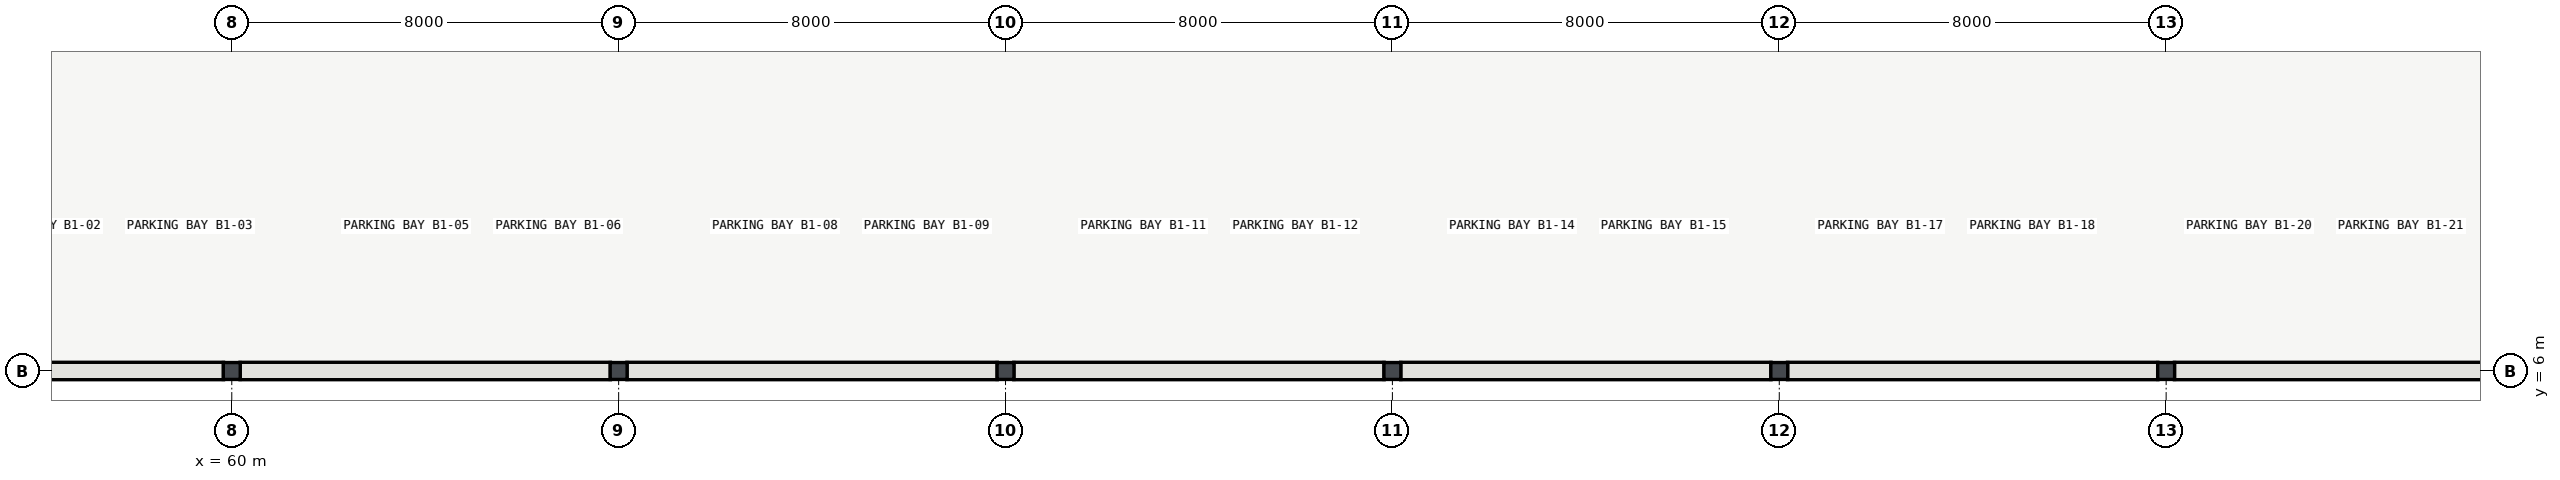
"""IFC4 building model, lengths in metres.
Left out: names, types, materials, properties, quantities, classifications, styles, units other than length and angle.
Written with IfcOpenShell. Run it as: python <this file> out.ifc"""

import sys

from ifc_helpers import new_model, si_unit, direction, frame, frame_2d, origin, origin_2d, place, context, subcontext, project, spatial, rectangle, i_section, extrude, element, save


model = new_model("IFC4")
c1 = context("Model", 3, precision=1e-05, world=origin(), true_north=direction((0.0, 1.0)))
c2 = subcontext(c1, "Body", "Model", "MODEL_VIEW")
j1 = project(units=[si_unit("LENGTHUNIT", "METRE"), si_unit("PLANEANGLEUNIT", "RADIAN")], contexts=[c1])
p1 = place(None, origin())
s1 = spatial("IfcSite", under=j1, at=p1, CompositionType="ELEMENT")
p2 = place(p1, origin())
s2 = spatial("IfcBuilding", under=s1, at=p2, CompositionType="ELEMENT")
p3 = place(p2, frame((0.0, 0.0, -4.8)))
s3 = spatial("IfcBuildingStorey", under=s2, at=p3, CompositionType="ELEMENT", Elevation=-4.8)
for number, where, z_axis, x_axis in (
    (1, (60.0, 6.0, 0.0), (0.0, 0.0, 1.0), (1.0, 0.0, 0.0)),
    (2, (68.0, 6.0, 0.0), (0.0, 0.0, 1.0), (1.0, 0.0, 0.0)),
    (3, (76.0, 6.0, 0.0), (0.0, 0.0, 1.0), (1.0, 0.0, 0.0)),
    (4, (84.0, 6.0, 0.0), (0.0, 0.0, 1.0), (1.0, 0.0, 0.0)),
    (5, (92.0, 6.0, 0.0), (0.0, 0.0, 1.0), (1.0, 0.0, 0.0)),
    (6, (100.0, 6.0, 0.0), (0.0, 0.0, 1.0), (1.0, 0.0, 0.0)),
):
    element("IfcColumn", number, at=place(p3, frame(where, z_axis=z_axis, x_axis=x_axis)), inside=s3, PredefinedType="COLUMN", context=c2, shape_type="SweptSolid", body=[
        extrude(i_section(OverallWidth=0.35, OverallDepth=0.35, WebThickness=0.012, FlangeThickness=0.019, FilletRadius=0.02, at=origin_2d()), origin(), (0.0, 0.0, 1.0), 4.8),
    ])
for number, where, z_axis, x_axis in (
    (7, (52.171, 6.0, 0.0), (0.0, 0.0, 1.0), (1.0, 0.0, 0.0)),
    (8, (60.171, 6.0, 0.0), (0.0, 0.0, 1.0), (1.0, 0.0, 0.0)),
    (9, (68.171, 6.0, 0.0), (0.0, 0.0, 1.0), (1.0, 0.0, 0.0)),
    (10, (76.171, 6.0, 0.0), (0.0, 0.0, 1.0), (1.0, 0.0, 0.0)),
    (11, (84.171, 6.0, 0.0), (0.0, 0.0, 1.0), (1.0, 0.0, 0.0)),
    (12, (92.171, 6.0, 0.0), (0.0, 0.0, 1.0), (1.0, 0.0, 0.0)),
    (13, (100.171, 6.0, 0.0), (0.0, 0.0, 1.0), (1.0, 0.0, 0.0)),
):
    element("IfcWall", number, at=place(p3, frame(where, z_axis=z_axis, x_axis=x_axis)), inside=s3, PredefinedType="USERDEFINED", context=c2, shape_type="SweptSolid", body=[
        extrude(rectangle(XDim=7.658, YDim=0.36, at=frame_2d((3.829, 0.0))), origin(), (0.0, 0.0, 1.0), 4.043),
    ])
save(model, sys.argv[1])
